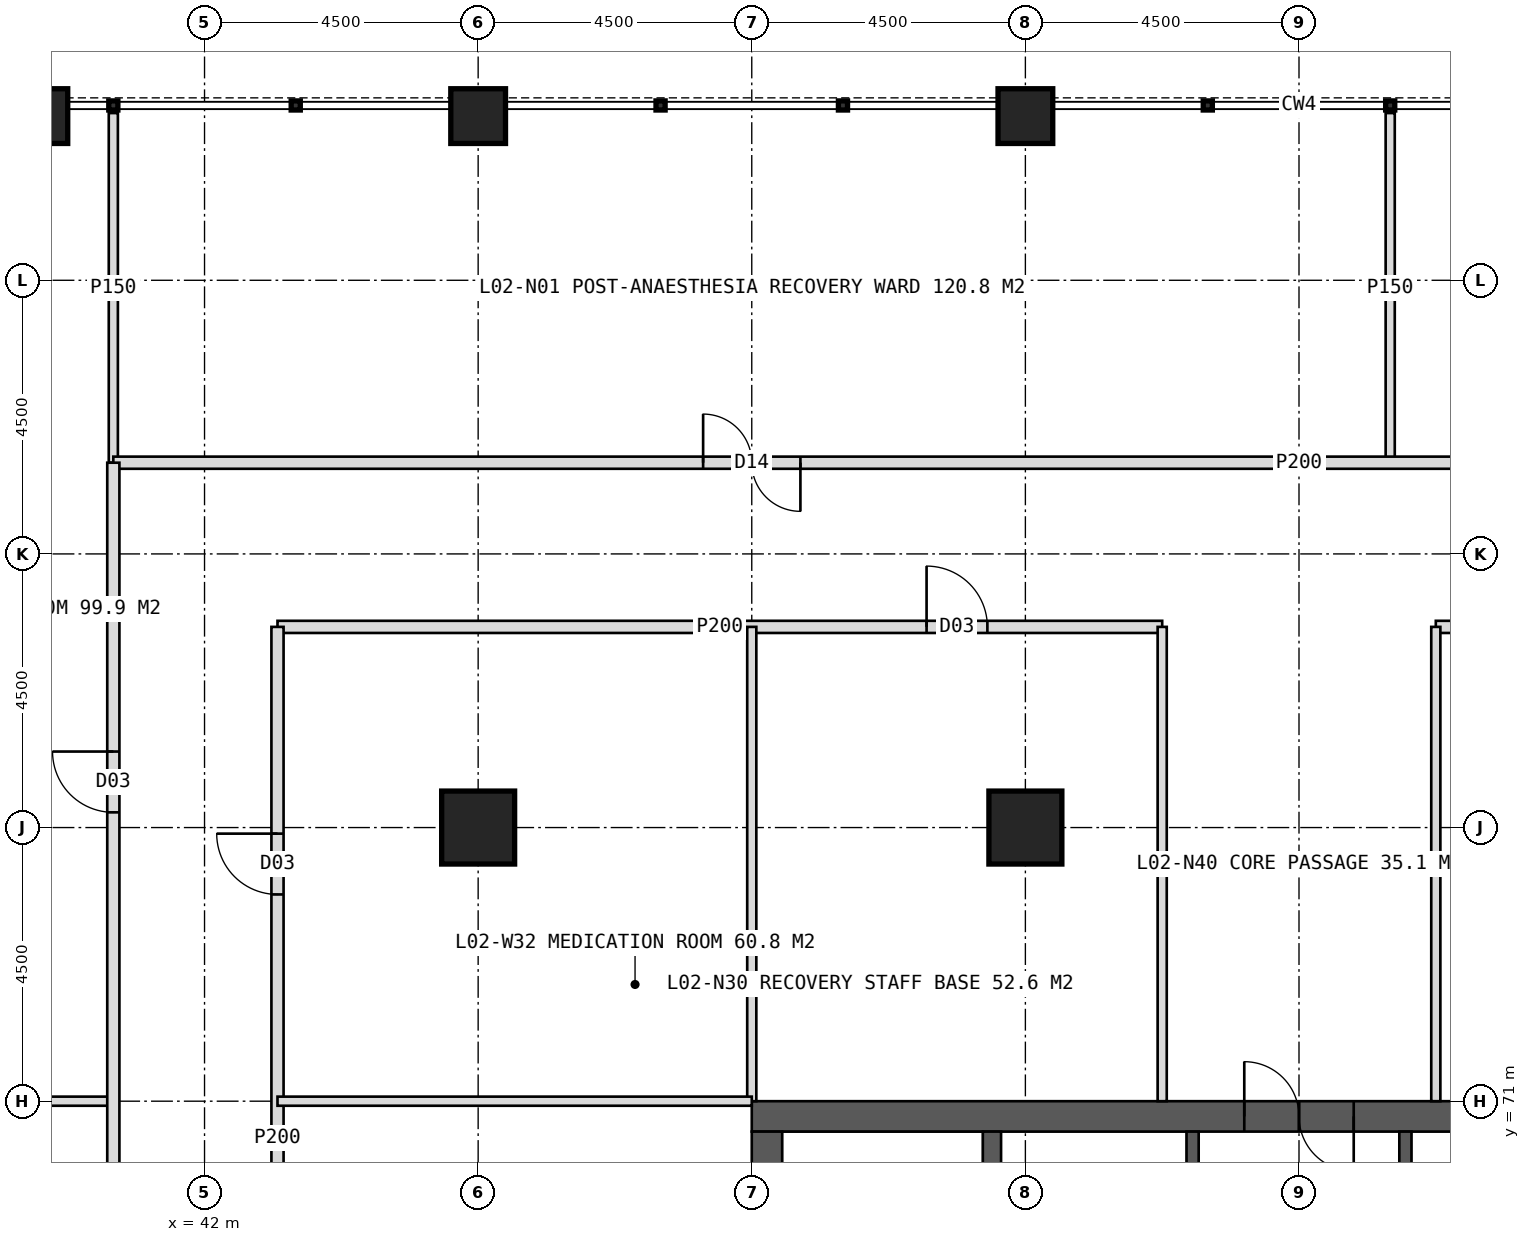
"""IFC4 building model, lengths in metres.
Left out: names, types, materials, properties, quantities, classifications, styles, units other than length and angle.
Written with IfcOpenShell. Run it as: python <this file> out.ifc"""

import sys

from ifc_helpers import new_model, si_unit, direction, frame, frame_2d, origin, origin_2d, place, context, subcontext, project, spatial, rectangle, hollow_rectangle, extrude, element, fill, save


model = new_model("IFC4")
c1 = context("Model", 3, precision=1e-05, world=origin(), true_north=direction((0.0, 1.0)))
c2 = subcontext(c1, "Body", "Model", "MODEL_VIEW")
j1 = project(units=[si_unit("LENGTHUNIT", "METRE"), si_unit("PLANEANGLEUNIT", "RADIAN")], contexts=[c1])
p1 = place(None, origin())
s1 = spatial("IfcSite", under=j1, at=p1, CompositionType="ELEMENT")
p2 = place(p1, origin())
s2 = spatial("IfcBuilding", under=s1, at=p2, CompositionType="ELEMENT")
p3 = place(p2, frame((0.0, 0.0, 11.0)))
s3 = spatial("IfcBuildingStorey", under=s2, at=p3, CompositionType="ELEMENT", Elevation=11.0)
p4 = place(p3, frame((51.0, 70.75, 0.0), z_axis=(0.0, 0.0, 1.0), x_axis=(1.0, 0.0, 0.0)))
e1 = element("IfcWall", 1, at=p4, inside=s3, PredefinedType="SHEAR", context=c2, shape_type="SweptSolid", body=[
    extrude(rectangle(XDim=18.0, YDim=0.5, at=frame_2d((9.0, 0.0))), origin(), (0.0, 0.0, 1.0), 5.5),
])
p5 = place(p4, frame((8.1, 0.0, 0.0)))
e2 = element("IfcOpeningElement", 2, at=p5, cuts=e1, PredefinedType="OPENING", context=c2, shape_type="SweptSolid", body=[
    extrude(rectangle(XDim=1.8, YDim=2.2, at=frame_2d((0.9, 1.1))), frame((0.0, 0.26, 0.0), z_axis=(0.0, -1.0, 0.0), x_axis=(1.0, 0.0, 0.0)), (0.0, 0.0, 1.0), 0.52),
])
p6 = place(p3, frame((51.25, 53.5, 0.0), z_axis=(0.0, 0.0, 1.0), x_axis=(0.0, 1.0, 0.0)))
e3 = element("IfcWall", 3, at=p6, inside=s3, PredefinedType="SHEAR", context=c2, shape_type="SweptSolid", body=[
    extrude(rectangle(XDim=17.0, YDim=0.5, at=frame_2d((8.5, 0.0))), origin(), (0.0, 0.0, 1.0), 5.5),
])
p7 = place(p6, frame((6.0, 0.0, 0.0)))
e4 = element("IfcOpeningElement", 4, at=p7, cuts=e3, PredefinedType="OPENING", context=c2, shape_type="SweptSolid", body=[
    extrude(rectangle(XDim=1.5, YDim=2.2, at=frame_2d((0.75, 1.1))), frame((0.0, 0.26, 0.0), z_axis=(0.0, -1.0, 0.0), x_axis=(1.0, 0.0, 0.0)), (0.0, 0.0, 1.0), 0.52),
])
p8 = place(p3, frame((54.95, 53.5, 0.0), z_axis=(0.0, 0.0, 1.0), x_axis=(0.0, 1.0, 0.0)))
e5 = element("IfcWall", 5, at=p8, inside=s3, PredefinedType="SHEAR", context=c2, shape_type="SweptSolid", body=[
    extrude(rectangle(XDim=17.0, YDim=0.3, at=frame_2d((8.5, 0.0))), origin(), (0.0, 0.0, 1.0), 5.5),
])
p9 = place(p3, frame((58.25, 53.5, 0.0), z_axis=(0.0, 0.0, 1.0), x_axis=(0.0, 1.0, 0.0)))
e6 = element("IfcWall", 6, at=p9, inside=s3, PredefinedType="SHEAR", context=c2, shape_type="SweptSolid", body=[
    extrude(rectangle(XDim=17.0, YDim=0.2, at=frame_2d((8.5, 0.0))), origin(), (0.0, 0.0, 1.0), 5.5),
])
p10 = place(p9, frame((1.375, 0.0, 0.0)))
e7 = element("IfcOpeningElement", 7, at=p10, cuts=e6, PredefinedType="OPENING", context=c2, shape_type="SweptSolid", body=[
    extrude(rectangle(XDim=1.4, YDim=2.2, at=frame_2d((0.7, 1.1))), frame((0.0, 0.11, 0.0), z_axis=(0.0, -1.0, 0.0), x_axis=(1.0, 0.0, 0.0)), (0.0, 0.0, 1.0), 0.22),
])
p11 = place(p9, frame((5.675, 0.0, 0.0)))
e8 = element("IfcOpeningElement", 8, at=p11, cuts=e6, PredefinedType="OPENING", context=c2, shape_type="SweptSolid", body=[
    extrude(rectangle(XDim=1.4, YDim=2.2, at=frame_2d((0.7, 1.1))), frame((0.0, 0.11, 0.0), z_axis=(0.0, -1.0, 0.0), x_axis=(1.0, 0.0, 0.0)), (0.0, 0.0, 1.0), 0.22),
])
p12 = place(p3, frame((61.75, 53.5, 0.0), z_axis=(0.0, 0.0, 1.0), x_axis=(0.0, 1.0, 0.0)))
e9 = element("IfcWall", 9, at=p12, inside=s3, PredefinedType="SHEAR", context=c2, shape_type="SweptSolid", body=[
    extrude(rectangle(XDim=17.0, YDim=0.2, at=frame_2d((8.5, 0.0))), origin(), (0.0, 0.0, 1.0), 5.5),
])
p13 = place(p12, frame((1.375, 0.0, 0.0)))
e10 = element("IfcOpeningElement", 10, at=p13, cuts=e9, PredefinedType="OPENING", context=c2, shape_type="SweptSolid", body=[
    extrude(rectangle(XDim=1.4, YDim=2.2, at=frame_2d((0.7, 1.1))), frame((0.0, 0.11, 0.0), z_axis=(0.0, -1.0, 0.0), x_axis=(1.0, 0.0, 0.0)), (0.0, 0.0, 1.0), 0.22),
])
p14 = place(p12, frame((5.675, 0.0, 0.0)))
e11 = element("IfcOpeningElement", 11, at=p14, cuts=e9, PredefinedType="OPENING", context=c2, shape_type="SweptSolid", body=[
    extrude(rectangle(XDim=1.4, YDim=2.2, at=frame_2d((0.7, 1.1))), frame((0.0, 0.11, 0.0), z_axis=(0.0, -1.0, 0.0), x_axis=(1.0, 0.0, 0.0)), (0.0, 0.0, 1.0), 0.22),
])
for number, where, z_axis, x_axis in (
    (12, (46.5, 75.5, 0.0), (0.0, 0.0, 1.0), (1.0, 0.0, 0.0)),
    (13, (55.5, 75.5, 0.0), (0.0, 0.0, 1.0), (1.0, 0.0, 0.0)),
):
    element("IfcColumn", number, at=place(p3, frame(where, z_axis=z_axis, x_axis=x_axis)), inside=s3, PredefinedType="COLUMN", context=c2, shape_type="SweptSolid", body=[
        extrude(hollow_rectangle(XDim=1.2, YDim=1.2, WallThickness=0.1, at=origin_2d()), origin(), (0.0, 0.0, 1.0), 5.5),
    ])
for number, where, z_axis, x_axis in (
    (14, (39.3, 87.2, 0.0), (0.0, 0.0, 1.0), (1.0, 0.0, 0.0)),
    (15, (46.5, 87.2, 0.0), (0.0, 0.0, 1.0), (1.0, 0.0, 0.0)),
    (16, (55.5, 87.2, 0.0), (0.0, 0.0, 1.0), (1.0, 0.0, 0.0)),
):
    element("IfcColumn", number, at=place(p3, frame(where, z_axis=z_axis, x_axis=x_axis)), inside=s3, PredefinedType="COLUMN", context=c2, shape_type="SweptSolid", body=[
        extrude(hollow_rectangle(XDim=0.9, YDim=0.9, WallThickness=0.08, at=origin_2d()), origin(), (0.0, 0.0, 1.0), 5.5),
    ])
for number, where, z_axis, x_axis in (
    (17, (40.5, 81.5, 0.0), (0.0, 0.0, 1.0), (0.0, 1.0, 0.0)),
    (18, (61.5, 81.5, 0.0), (0.0, 0.0, 1.0), (0.0, 1.0, 0.0)),
):
    element("IfcWall", number, at=place(p3, frame(where, z_axis=z_axis, x_axis=x_axis)), inside=s3, PredefinedType="PARTITIONING", context=c2, shape_type="SweptSolid", body=[
        extrude(rectangle(XDim=5.75, YDim=0.15, at=frame_2d((2.875, 0.0))), origin(), (0.0, 0.0, 1.0), 5.2),
    ])
p15 = place(p3, frame((40.5, 81.5, 0.0), z_axis=(0.0, 0.0, 1.0), x_axis=(1.0, 0.0, 0.0)))
e19 = element("IfcWall", 19, at=p15, inside=s3, PredefinedType="PARTITIONING", context=c2, shape_type="SweptSolid", body=[
    extrude(rectangle(XDim=39.0, YDim=0.2, at=frame_2d((19.5, 0.0))), origin(), (0.0, 0.0, 1.0), 5.2),
])
p16 = place(p15, frame((9.7, 0.0, 0.0)))
e20 = element("IfcOpeningElement", 20, at=p16, cuts=e19, PredefinedType="OPENING", context=c2, shape_type="SweptSolid", body=[
    extrude(rectangle(XDim=1.6, YDim=2.2, at=frame_2d((0.8, 1.1))), frame((0.0, 0.11, 0.0), z_axis=(0.0, -1.0, 0.0), x_axis=(1.0, 0.0, 0.0)), (0.0, 0.0, 1.0), 0.22),
])
p17 = place(p15, frame((24.7, 0.0, 0.0)))
e21 = element("IfcOpeningElement", 21, at=p17, cuts=e19, PredefinedType="OPENING", context=c2, shape_type="SweptSolid", body=[
    extrude(rectangle(XDim=1.6, YDim=2.2, at=frame_2d((0.8, 1.1))), frame((0.0, 0.11, 0.0), z_axis=(0.0, -1.0, 0.0), x_axis=(1.0, 0.0, 0.0)), (0.0, 0.0, 1.0), 0.22),
])
p18 = place(p15, frame((33.7, 0.0, 0.0)))
e22 = element("IfcOpeningElement", 22, at=p18, cuts=e19, PredefinedType="OPENING", context=c2, shape_type="SweptSolid", body=[
    extrude(rectangle(XDim=1.6, YDim=2.2, at=frame_2d((0.8, 1.1))), frame((0.0, 0.11, 0.0), z_axis=(0.0, -1.0, 0.0), x_axis=(1.0, 0.0, 0.0)), (0.0, 0.0, 1.0), 0.22),
])
p19 = place(p3, frame((43.2, 78.8, 0.0), z_axis=(0.0, 0.0, 1.0), x_axis=(1.0, 0.0, 0.0)))
e23 = element("IfcWall", 23, at=p19, inside=s3, PredefinedType="PARTITIONING", context=c2, shape_type="SweptSolid", body=[
    extrude(rectangle(XDim=14.55, YDim=0.2, at=frame_2d((7.275, 0.0))), origin(), (0.0, 0.0, 1.0), 5.2),
])
p20 = place(p19, frame((10.675, 0.0, 0.0)))
e24 = element("IfcOpeningElement", 24, at=p20, cuts=e23, PredefinedType="OPENING", context=c2, shape_type="SweptSolid", body=[
    extrude(rectangle(XDim=1.0, YDim=2.1, at=frame_2d((0.5, 1.05))), frame((0.0, 0.11, 0.0), z_axis=(0.0, -1.0, 0.0), x_axis=(1.0, 0.0, 0.0)), (0.0, 0.0, 1.0), 0.22),
])
p21 = place(p3, frame((62.25, 78.8, 0.0), z_axis=(0.0, 0.0, 1.0), x_axis=(1.0, 0.0, 0.0)))
e25 = element("IfcWall", 25, at=p21, inside=s3, PredefinedType="PARTITIONING", context=c2, shape_type="SweptSolid", body=[
    extrude(rectangle(XDim=6.75, YDim=0.2, at=frame_2d((3.375, 0.0))), origin(), (0.0, 0.0, 1.0), 5.2),
])
p22 = place(p21, frame((2.875, 0.0, 0.0)))
e26 = element("IfcOpeningElement", 26, at=p22, cuts=e25, PredefinedType="OPENING", context=c2, shape_type="SweptSolid", body=[
    extrude(rectangle(XDim=1.0, YDim=2.1, at=frame_2d((0.5, 1.05))), frame((0.0, 0.11, 0.0), z_axis=(0.0, -1.0, 0.0), x_axis=(1.0, 0.0, 0.0)), (0.0, 0.0, 1.0), 0.22),
])
for number, where, z_axis, x_axis in (
    (27, (51.0, 71.0, 0.0), (0.0, 0.0, 1.0), (0.0, 1.0, 0.0)),
    (28, (57.75, 71.0, 0.0), (0.0, 0.0, 1.0), (0.0, 1.0, 0.0)),
    (29, (62.25, 71.0, 0.0), (0.0, 0.0, 1.0), (0.0, 1.0, 0.0)),
):
    element("IfcWall", number, at=place(p3, frame(where, z_axis=z_axis, x_axis=x_axis)), inside=s3, PredefinedType="PARTITIONING", context=c2, shape_type="SweptSolid", body=[
        extrude(rectangle(XDim=7.8, YDim=0.15, at=frame_2d((3.9, 0.0))), origin(), (0.0, 0.0, 1.0), 5.2),
    ])
p23 = place(p3, frame((40.5, 71.0, 0.0), z_axis=(0.0, 0.0, 1.0), x_axis=(-1.0, 0.0, 0.0)))
e30 = element("IfcWall", 30, at=p23, inside=s3, PredefinedType="PARTITIONING", context=c2, shape_type="SweptSolid", body=[
    extrude(rectangle(XDim=6.15, YDim=0.15, at=frame_2d((3.075, 0.0))), origin(), (0.0, 0.0, 1.0), 5.2),
])
p24 = place(p3, frame((40.5, 42.5, 0.0), z_axis=(0.0, 0.0, 1.0), x_axis=(0.0, 1.0, 0.0)))
e31 = element("IfcWall", 31, at=p24, inside=s3, PredefinedType="PARTITIONING", context=c2, shape_type="SweptSolid", body=[
    extrude(rectangle(XDim=39.0, YDim=0.2, at=frame_2d((19.5, 0.0))), origin(), (0.0, 0.0, 1.0), 5.2),
])
p25 = place(p24, frame((0.65, 0.0, 0.0)))
e32 = element("IfcOpeningElement", 32, at=p25, cuts=e31, PredefinedType="OPENING", context=c2, shape_type="SweptSolid", body=[
    extrude(rectangle(XDim=1.6, YDim=2.2, at=frame_2d((0.8, 1.1))), frame((0.0, 0.11, 0.0), z_axis=(0.0, -1.0, 0.0), x_axis=(1.0, 0.0, 0.0)), (0.0, 0.0, 1.0), 0.22),
])
p26 = place(p24, frame((7.4, 0.0, 0.0)))
e33 = element("IfcOpeningElement", 33, at=p26, cuts=e31, PredefinedType="OPENING", context=c2, shape_type="SweptSolid", body=[
    extrude(rectangle(XDim=1.6, YDim=2.2, at=frame_2d((0.8, 1.1))), frame((0.0, 0.11, 0.0), z_axis=(0.0, -1.0, 0.0), x_axis=(1.0, 0.0, 0.0)), (0.0, 0.0, 1.0), 0.22),
])
p27 = place(p24, frame((15.7, 0.0, 0.0)))
e34 = element("IfcOpeningElement", 34, at=p27, cuts=e31, PredefinedType="OPENING", context=c2, shape_type="SweptSolid", body=[
    extrude(rectangle(XDim=1.6, YDim=2.2, at=frame_2d((0.8, 1.1))), frame((0.0, 0.11, 0.0), z_axis=(0.0, -1.0, 0.0), x_axis=(1.0, 0.0, 0.0)), (0.0, 0.0, 1.0), 0.22),
])
p28 = place(p24, frame((19.95, 0.0, 0.0)))
e35 = element("IfcOpeningElement", 35, at=p28, cuts=e31, PredefinedType="OPENING", context=c2, shape_type="SweptSolid", body=[
    extrude(rectangle(XDim=1.6, YDim=2.2, at=frame_2d((0.8, 1.1))), frame((0.0, 0.11, 0.0), z_axis=(0.0, -1.0, 0.0), x_axis=(1.0, 0.0, 0.0)), (0.0, 0.0, 1.0), 0.22),
])
p29 = place(p24, frame((24.75, 0.0, 0.0)))
e36 = element("IfcOpeningElement", 36, at=p29, cuts=e31, PredefinedType="OPENING", context=c2, shape_type="SweptSolid", body=[
    extrude(rectangle(XDim=1.0, YDim=2.1, at=frame_2d((0.5, 1.05))), frame((0.0, 0.11, 0.0), z_axis=(0.0, -1.0, 0.0), x_axis=(1.0, 0.0, 0.0)), (0.0, 0.0, 1.0), 0.22),
])
p30 = place(p24, frame((33.25, 0.0, 0.0)))
e37 = element("IfcOpeningElement", 37, at=p30, cuts=e31, PredefinedType="OPENING", context=c2, shape_type="SweptSolid", body=[
    extrude(rectangle(XDim=1.0, YDim=2.1, at=frame_2d((0.5, 1.05))), frame((0.0, 0.11, 0.0), z_axis=(0.0, -1.0, 0.0), x_axis=(1.0, 0.0, 0.0)), (0.0, 0.0, 1.0), 0.22),
])
p31 = place(p3, frame((43.2, 62.0, 0.0), z_axis=(0.0, 0.0, 1.0), x_axis=(0.0, 1.0, 0.0)))
e38 = element("IfcWall", 38, at=p31, inside=s3, PredefinedType="PARTITIONING", context=c2, shape_type="SweptSolid", body=[
    extrude(rectangle(XDim=16.8, YDim=0.2, at=frame_2d((8.4, 0.0))), origin(), (0.0, 0.0, 1.0), 5.2),
])
p32 = place(p31, frame((4.0, 0.0, 0.0)))
e39 = element("IfcOpeningElement", 39, at=p32, cuts=e38, PredefinedType="OPENING", context=c2, shape_type="SweptSolid", body=[
    extrude(rectangle(XDim=1.0, YDim=2.1, at=frame_2d((0.5, 1.05))), frame((0.0, 0.11, 0.0), z_axis=(0.0, -1.0, 0.0), x_axis=(1.0, 0.0, 0.0)), (0.0, 0.0, 1.0), 0.22),
])
p33 = place(p31, frame((12.4, 0.0, 0.0)))
e40 = element("IfcOpeningElement", 40, at=p33, cuts=e38, PredefinedType="OPENING", context=c2, shape_type="SweptSolid", body=[
    extrude(rectangle(XDim=1.0, YDim=2.1, at=frame_2d((0.5, 1.05))), frame((0.0, 0.11, 0.0), z_axis=(0.0, -1.0, 0.0), x_axis=(1.0, 0.0, 0.0)), (0.0, 0.0, 1.0), 0.22),
])
p34 = place(p3, frame((51.0, 71.0, 0.0), z_axis=(0.0, 0.0, 1.0), x_axis=(-1.0, 0.0, 0.0)))
e41 = element("IfcWall", 41, at=p34, inside=s3, PredefinedType="PARTITIONING", context=c2, shape_type="SweptSolid", body=[
    extrude(rectangle(XDim=7.8, YDim=0.15, at=frame_2d((3.9, 0.0))), origin(), (0.0, 0.0, 1.0), 5.2),
])
p35 = place(p20, origin())
e42 = element("IfcDoor", 42, at=p35, inside=s3, OperationType="SINGLE_SWING_LEFT", PredefinedType="DOOR", context=c2, shape_type="SweptSolid", body=[
    extrude(rectangle(XDim=1.0, YDim=2.1, at=frame_2d((0.5, 1.05))), frame((0.0, 0.025, 0.0), z_axis=(0.0, -1.0, 0.0), x_axis=(1.0, 0.0, 0.0)), (0.0, 0.0, 1.0), 0.05),
])
fill(e24, e42)
p36 = place(p33, origin())
e43 = element("IfcDoor", 43, at=p36, inside=s3, OperationType="SINGLE_SWING_RIGHT", PredefinedType="DOOR", context=c2, shape_type="SweptSolid", body=[
    extrude(rectangle(XDim=1.0, YDim=2.1, at=frame_2d((0.5, 1.05))), frame((0.0, 0.025, 0.0), z_axis=(0.0, -1.0, 0.0), x_axis=(1.0, 0.0, 0.0)), (0.0, 0.0, 1.0), 0.05),
])
fill(e40, e43)
p37 = place(p5, origin())
e44 = element("IfcDoor", 44, at=p37, inside=s3, OperationType="DOUBLE_DOOR_SINGLE_SWING", PredefinedType="DOOR", context=c2, shape_type="SweptSolid", body=[
    extrude(rectangle(XDim=1.8, YDim=2.2, at=frame_2d((0.9, 1.1))), frame((0.0, 0.025, 0.0), z_axis=(0.0, -1.0, 0.0), x_axis=(1.0, 0.0, 0.0)), (0.0, 0.0, 1.0), 0.05),
])
fill(e2, e44)
p38 = place(p16, origin())
e45 = element("IfcDoor", 45, at=p38, inside=s3, OperationType="DOUBLE_DOOR_DOUBLE_SWING", PredefinedType="DOOR", context=c2, shape_type="SweptSolid", body=[
    extrude(rectangle(XDim=1.6, YDim=2.2, at=frame_2d((0.8, 1.1))), frame((0.0, 0.025, 0.0), z_axis=(0.0, -1.0, 0.0), x_axis=(1.0, 0.0, 0.0)), (0.0, 0.0, 1.0), 0.05),
])
fill(e20, e45)
p39 = place(p30, origin())
e46 = element("IfcDoor", 46, at=p39, inside=s3, OperationType="SINGLE_SWING_RIGHT", PredefinedType="DOOR", context=c2, shape_type="SweptSolid", body=[
    extrude(rectangle(XDim=1.0, YDim=2.1, at=frame_2d((0.5, 1.05))), frame((0.0, 0.025, 0.0), z_axis=(0.0, -1.0, 0.0), x_axis=(1.0, 0.0, 0.0)), (0.0, 0.0, 1.0), 0.05),
])
fill(e37, e46)
save(model, sys.argv[1])
